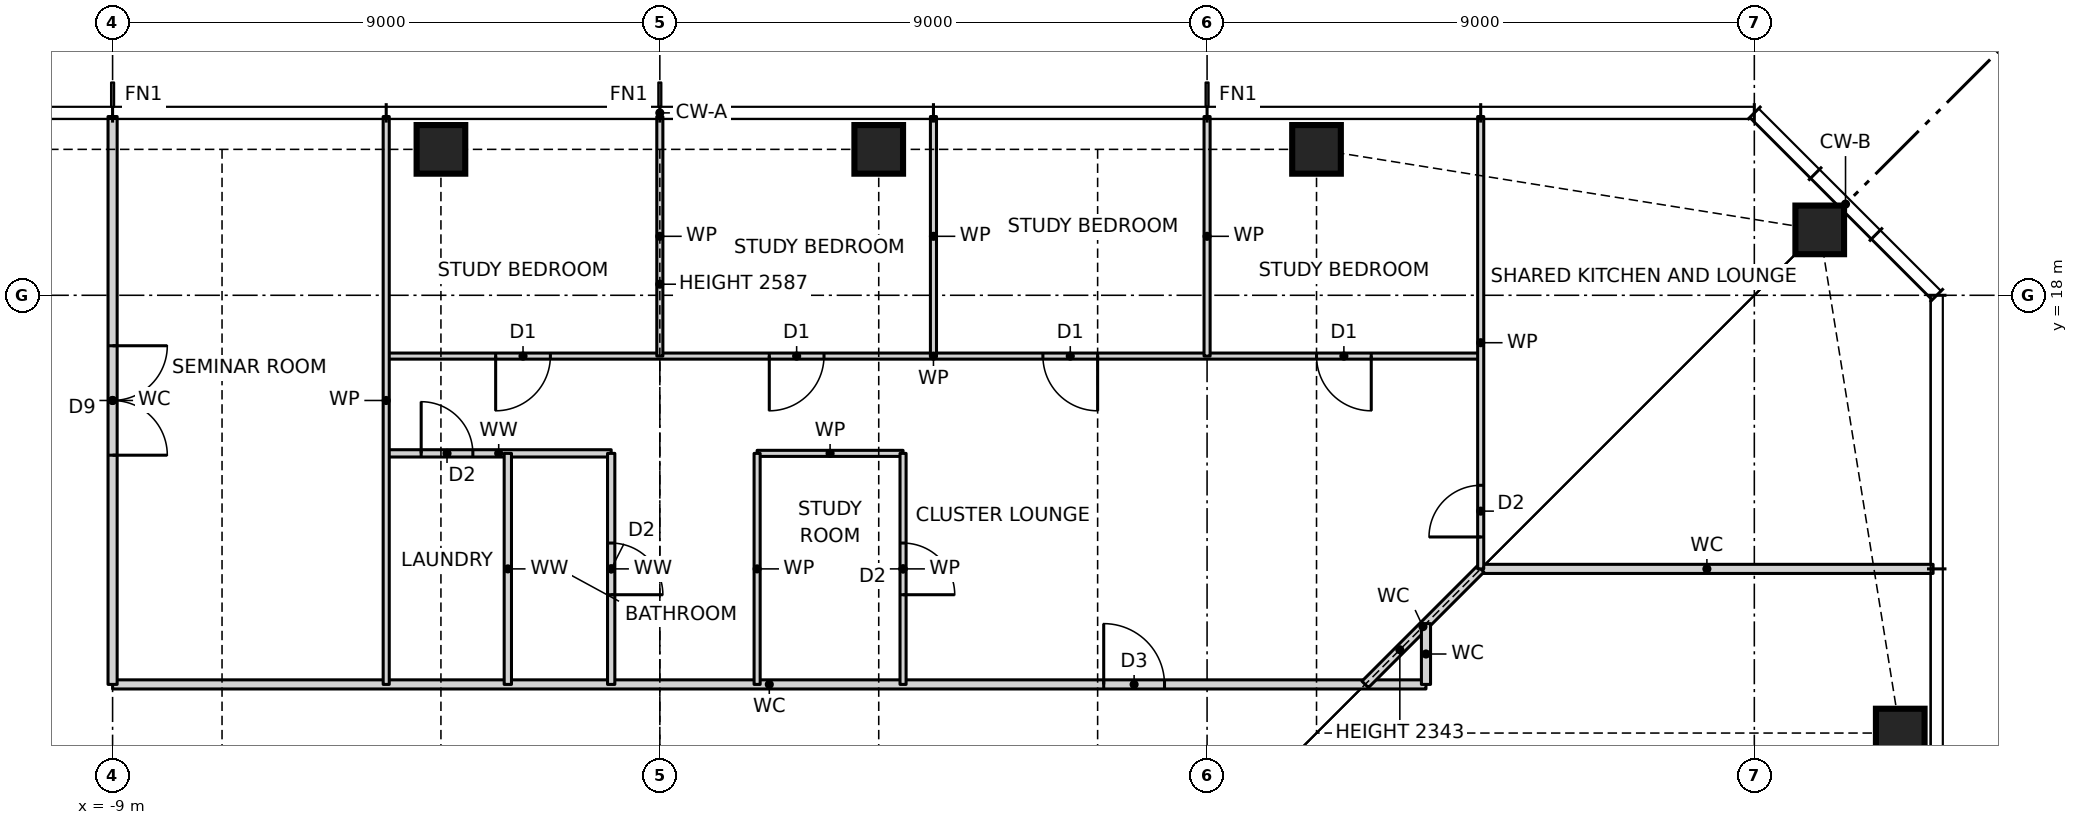
"""IFC4 building model, lengths in metres.
Left out: names, types, materials, properties, quantities, classifications, styles, units other than length and angle.
Written with IfcOpenShell. Run it as: python <this file> out.ifc"""

import sys

from ifc_helpers import new_model, si_unit, direction, frame, frame_2d, origin, origin_2d, place, context, subcontext, project, spatial, rectangle, hollow_rectangle, extrude, element, fill, save


model = new_model("IFC4")
c1 = context("Model", 3, precision=1e-05, world=origin(), true_north=direction((0.0, 1.0)))
c2 = subcontext(c1, "Body", "Model", "MODEL_VIEW")
j1 = project(units=[si_unit("LENGTHUNIT", "METRE"), si_unit("PLANEANGLEUNIT", "RADIAN")], contexts=[c1])
p1 = place(None, origin())
s1 = spatial("IfcSite", under=j1, at=p1, CompositionType="ELEMENT")
p2 = place(p1, origin())
s2 = spatial("IfcBuilding", under=s1, at=p2, CompositionType="ELEMENT")
p3 = place(p2, frame((0.0, 0.0, 94.5)))
s3 = spatial("IfcBuildingStorey", under=s2, at=p3, CompositionType="ELEMENT", Elevation=94.5)
for number, where, z_axis, x_axis in (
    (1, (20.4, 10.8, 0.0), (0.0, 0.0, 1.0), (1.0, 0.0, 0.0)),
    (2, (19.076, 19.076, 0.0), (0.0, 0.0, 1.0), (1.0, 0.0, 0.0)),
    (3, (10.8, 20.4, 0.0), (0.0, 0.0, 1.0), (1.0, 0.0, 0.0)),
    (4, (3.6, 20.4, 0.0), (0.0, 0.0, 1.0), (1.0, 0.0, 0.0)),
    (5, (-3.6, 20.4, 0.0), (0.0, 0.0, 1.0), (1.0, 0.0, 0.0)),
):
    element("IfcColumn", number, at=place(p3, frame(where, z_axis=z_axis, x_axis=x_axis)), inside=s3, PredefinedType="COLUMN", context=c2, shape_type="SweptSolid", body=[
        extrude(hollow_rectangle(XDim=0.8, YDim=0.8, WallThickness=0.07, at=origin_2d()), origin(), (0.0, 0.0, 1.0), 3.5),
    ])
p4 = place(p3, frame((-9.0, 11.6, 0.0), z_axis=(0.0, 0.0, 1.0), x_axis=(1.0, 0.0, 0.0)))
e6 = element("IfcWall", 6, at=p4, inside=s3, PredefinedType="PARTITIONING", context=c2, shape_type="SweptSolid", body=[
    extrude(rectangle(XDim=21.6, YDim=0.15, at=frame_2d((10.8, 0.0))), origin(), (0.0, 0.0, 1.0), 3.27),
])
p5 = place(p4, frame((16.3, 0.0, 0.0)))
e7 = element("IfcOpeningElement", 7, at=p5, cuts=e6, PredefinedType="OPENING", context=c2, shape_type="SweptSolid", body=[
    extrude(rectangle(XDim=1.0, YDim=2.1, at=frame_2d((0.5, 1.05))), frame((0.0, 0.085, 0.0), z_axis=(0.0, -1.0, 0.0), x_axis=(1.0, 0.0, 0.0)), (0.0, 0.0, 1.0), 0.17),
])
p6 = place(p3, frame((13.5, 13.5, 0.0), z_axis=(0.0, 0.0, 1.0), x_axis=(1.0, 0.0, 0.0)))
e8 = element("IfcWall", 8, at=p6, inside=s3, PredefinedType="PARTITIONING", context=c2, shape_type="SweptSolid", body=[
    extrude(rectangle(XDim=7.44, YDim=0.15, at=frame_2d((3.72, 0.0))), origin(), (0.0, 0.0, 1.0), 3.27),
])
p7 = place(p3, frame((-4.5, 15.4, 0.0), z_axis=(0.0, 0.0, 1.0), x_axis=(1.0, 0.0, 0.0)))
e9 = element("IfcWall", 9, at=p7, inside=s3, PredefinedType="PARTITIONING", context=c2, shape_type="SweptSolid", body=[
    extrude(rectangle(XDim=3.7, YDim=0.12, at=frame_2d((1.85, 0.0))), origin(), (0.0, 0.0, 1.0), 3.27),
])
p8 = place(p7, frame((0.575, 0.0, 0.0)))
e10 = element("IfcOpeningElement", 10, at=p8, cuts=e9, PredefinedType="OPENING", context=c2, shape_type="SweptSolid", body=[
    extrude(rectangle(XDim=0.85, YDim=2.1, at=frame_2d((0.425, 1.05))), frame((0.0, 0.07, 0.0), z_axis=(0.0, -1.0, 0.0), x_axis=(1.0, 0.0, 0.0)), (0.0, 0.0, 1.0), 0.14),
])
p9 = place(p3, frame((1.6, 15.4, 0.0), z_axis=(0.0, 0.0, 1.0), x_axis=(1.0, 0.0, 0.0)))
e11 = element("IfcWall", 11, at=p9, inside=s3, PredefinedType="PARTITIONING", context=c2, shape_type="SweptSolid", body=[
    extrude(rectangle(XDim=2.4, YDim=0.1, at=frame_2d((1.2, 0.0))), origin(), (0.0, 0.0, 1.0), 3.27),
])
p10 = place(p3, frame((-4.5, 17.0, 0.0), z_axis=(0.0, 0.0, 1.0), x_axis=(1.0, 0.0, 0.0)))
e12 = element("IfcWall", 12, at=p10, inside=s3, PredefinedType="PARTITIONING", context=c2, shape_type="SweptSolid", body=[
    extrude(rectangle(XDim=18.0, YDim=0.1, at=frame_2d((9.0, 0.0))), origin(), (0.0, 0.0, 1.0), 3.27),
])
p11 = place(p10, frame((15.3, 0.0, 0.0)))
e13 = element("IfcOpeningElement", 13, at=p11, cuts=e12, PredefinedType="OPENING", context=c2, shape_type="SweptSolid", body=[
    extrude(rectangle(XDim=0.9, YDim=2.1, at=frame_2d((0.45, 1.05))), frame((0.0, 0.06, 0.0), z_axis=(0.0, -1.0, 0.0), x_axis=(1.0, 0.0, 0.0)), (0.0, 0.0, 1.0), 0.12),
])
p12 = place(p10, frame((10.8, 0.0, 0.0)))
e14 = element("IfcOpeningElement", 14, at=p12, cuts=e12, PredefinedType="OPENING", context=c2, shape_type="SweptSolid", body=[
    extrude(rectangle(XDim=0.9, YDim=2.1, at=frame_2d((0.45, 1.05))), frame((0.0, 0.06, 0.0), z_axis=(0.0, -1.0, 0.0), x_axis=(1.0, 0.0, 0.0)), (0.0, 0.0, 1.0), 0.12),
])
p13 = place(p10, frame((6.3, 0.0, 0.0)))
e15 = element("IfcOpeningElement", 15, at=p13, cuts=e12, PredefinedType="OPENING", context=c2, shape_type="SweptSolid", body=[
    extrude(rectangle(XDim=0.9, YDim=2.1, at=frame_2d((0.45, 1.05))), frame((0.0, 0.06, 0.0), z_axis=(0.0, -1.0, 0.0), x_axis=(1.0, 0.0, 0.0)), (0.0, 0.0, 1.0), 0.12),
])
p14 = place(p10, frame((1.8, 0.0, 0.0)))
e16 = element("IfcOpeningElement", 16, at=p14, cuts=e12, PredefinedType="OPENING", context=c2, shape_type="SweptSolid", body=[
    extrude(rectangle(XDim=0.9, YDim=2.1, at=frame_2d((0.45, 1.05))), frame((0.0, 0.06, 0.0), z_axis=(0.0, -1.0, 0.0), x_axis=(1.0, 0.0, 0.0)), (0.0, 0.0, 1.0), 0.12),
])
p15 = place(p3, frame((11.6, 11.6, 0.0), z_axis=(0.0, 0.0, 1.0), x_axis=(0.707106781187, 0.707106781187, 0.0)))
e17 = element("IfcWall", 17, at=p15, inside=s3, PredefinedType="PARTITIONING", context=c2, shape_type="SweptSolid", body=[
    extrude(rectangle(XDim=2.687, YDim=0.15, at=frame_2d((1.343, 0.0))), origin(), (0.0, 0.0, 1.0), 2.343),
])
p16 = place(p3, frame((13.5, 13.5, 0.0), z_axis=(0.0, 0.0, 1.0), x_axis=(0.0, 1.0, 0.0)))
e18 = element("IfcWall", 18, at=p16, inside=s3, PredefinedType="PARTITIONING", context=c2, shape_type="SweptSolid", body=[
    extrude(rectangle(XDim=7.44, YDim=0.1, at=frame_2d((3.72, 0.0))), origin(), (0.0, 0.0, 1.0), 3.27),
])
p17 = place(p16, frame((0.525, 0.0, 0.0)))
e19 = element("IfcOpeningElement", 19, at=p17, cuts=e18, PredefinedType="OPENING", context=c2, shape_type="SweptSolid", body=[
    extrude(rectangle(XDim=0.85, YDim=2.1, at=frame_2d((0.425, 1.05))), frame((0.0, 0.06, 0.0), z_axis=(0.0, -1.0, 0.0), x_axis=(1.0, 0.0, 0.0)), (0.0, 0.0, 1.0), 0.12),
])
p18 = place(p3, frame((12.6, 11.6, 0.0), z_axis=(0.0, 0.0, 1.0), x_axis=(0.0, 1.0, 0.0)))
e20 = element("IfcWall", 20, at=p18, inside=s3, PredefinedType="PARTITIONING", context=c2, shape_type="SweptSolid", body=[
    extrude(rectangle(XDim=1.0, YDim=0.15, at=frame_2d((0.5, 0.0))), origin(), (0.0, 0.0, 1.0), 3.27),
])
for number, where, z_axis, x_axis in (
    (21, (9.0, 17.0, 0.0), (0.0, 0.0, 1.0), (0.0, 1.0, 0.0)),
    (22, (4.5, 17.0, 0.0), (0.0, 0.0, 1.0), (0.0, 1.0, 0.0)),
):
    element("IfcWall", number, at=place(p3, frame(where, z_axis=z_axis, x_axis=x_axis)), inside=s3, PredefinedType="PARTITIONING", context=c2, shape_type="SweptSolid", body=[
        extrude(rectangle(XDim=3.94, YDim=0.1, at=frame_2d((1.97, 0.0))), origin(), (0.0, 0.0, 1.0), 3.27),
    ])
p19 = place(p3, frame((4.0, 11.6, 0.0), z_axis=(0.0, 0.0, 1.0), x_axis=(0.0, 1.0, 0.0)))
e23 = element("IfcWall", 23, at=p19, inside=s3, PredefinedType="PARTITIONING", context=c2, shape_type="SweptSolid", body=[
    extrude(rectangle(XDim=3.8, YDim=0.1, at=frame_2d((1.9, 0.0))), origin(), (0.0, 0.0, 1.0), 3.27),
])
p20 = place(p19, frame((1.475, 0.0, 0.0)))
e24 = element("IfcOpeningElement", 24, at=p20, cuts=e23, PredefinedType="OPENING", context=c2, shape_type="SweptSolid", body=[
    extrude(rectangle(XDim=0.85, YDim=2.1, at=frame_2d((0.425, 1.05))), frame((0.0, 0.06, 0.0), z_axis=(0.0, -1.0, 0.0), x_axis=(1.0, 0.0, 0.0)), (0.0, 0.0, 1.0), 0.12),
])
p21 = place(p3, frame((1.6, 11.6, 0.0), z_axis=(0.0, 0.0, 1.0), x_axis=(0.0, 1.0, 0.0)))
e25 = element("IfcWall", 25, at=p21, inside=s3, PredefinedType="PARTITIONING", context=c2, shape_type="SweptSolid", body=[
    extrude(rectangle(XDim=3.8, YDim=0.1, at=frame_2d((1.9, 0.0))), origin(), (0.0, 0.0, 1.0), 3.27),
])
p22 = place(p3, frame((0.0, 17.0, 0.0), z_axis=(0.0, 0.0, 1.0), x_axis=(0.0, 1.0, 0.0)))
e26 = element("IfcWall", 26, at=p22, inside=s3, PredefinedType="PARTITIONING", context=c2, shape_type="SweptSolid", body=[
    extrude(rectangle(XDim=3.94, YDim=0.1, at=frame_2d((1.97, 0.0))), origin(), (0.0, 0.0, 1.0), 2.587),
])
p23 = place(p3, frame((-0.8, 11.6, 0.0), z_axis=(0.0, 0.0, 1.0), x_axis=(0.0, 1.0, 0.0)))
e27 = element("IfcWall", 27, at=p23, inside=s3, PredefinedType="PARTITIONING", context=c2, shape_type="SweptSolid", body=[
    extrude(rectangle(XDim=3.8, YDim=0.12, at=frame_2d((1.9, 0.0))), origin(), (0.0, 0.0, 1.0), 3.27),
])
p24 = place(p23, frame((1.475, 0.0, 0.0)))
e28 = element("IfcOpeningElement", 28, at=p24, cuts=e27, PredefinedType="OPENING", context=c2, shape_type="SweptSolid", body=[
    extrude(rectangle(XDim=0.85, YDim=2.1, at=frame_2d((0.425, 1.05))), frame((0.0, 0.07, 0.0), z_axis=(0.0, -1.0, 0.0), x_axis=(1.0, 0.0, 0.0)), (0.0, 0.0, 1.0), 0.14),
])
p25 = place(p3, frame((-2.5, 11.6, 0.0), z_axis=(0.0, 0.0, 1.0), x_axis=(0.0, 1.0, 0.0)))
e29 = element("IfcWall", 29, at=p25, inside=s3, PredefinedType="PARTITIONING", context=c2, shape_type="SweptSolid", body=[
    extrude(rectangle(XDim=3.8, YDim=0.12, at=frame_2d((1.9, 0.0))), origin(), (0.0, 0.0, 1.0), 3.27),
])
p26 = place(p3, frame((-4.5, 11.6, 0.0), z_axis=(0.0, 0.0, 1.0), x_axis=(0.0, 1.0, 0.0)))
e30 = element("IfcWall", 30, at=p26, inside=s3, PredefinedType="PARTITIONING", context=c2, shape_type="SweptSolid", body=[
    extrude(rectangle(XDim=9.34, YDim=0.1, at=frame_2d((4.67, 0.0))), origin(), (0.0, 0.0, 1.0), 3.27),
])
p27 = place(p3, frame((-9.0, 11.6, 0.0), z_axis=(0.0, 0.0, 1.0), x_axis=(0.0, 1.0, 0.0)))
e31 = element("IfcWall", 31, at=p27, inside=s3, PredefinedType="PARTITIONING", context=c2, shape_type="SweptSolid", body=[
    extrude(rectangle(XDim=9.34, YDim=0.15, at=frame_2d((4.67, 0.0))), origin(), (0.0, 0.0, 1.0), 3.27),
])
p28 = place(p27, frame((3.77, 0.0, 0.0)))
e32 = element("IfcOpeningElement", 32, at=p28, cuts=e31, PredefinedType="OPENING", context=c2, shape_type="SweptSolid", body=[
    extrude(rectangle(XDim=1.8, YDim=2.1, at=frame_2d((0.9, 1.05))), frame((0.0, 0.085, 0.0), z_axis=(0.0, -1.0, 0.0), x_axis=(1.0, 0.0, 0.0)), (0.0, 0.0, 1.0), 0.17),
])
p29 = place(p11, frame((0.9, 0.0, 0.0), z_axis=(0.0, 0.0, 1.0), x_axis=(-1.0, 0.0, 0.0)))
e33 = element("IfcDoor", 33, at=p29, inside=s3, OperationType="SINGLE_SWING_LEFT", PredefinedType="DOOR", context=c2, shape_type="SweptSolid", body=[
    extrude(rectangle(XDim=0.9, YDim=2.1, at=frame_2d((0.45, 1.05))), frame((0.0, 0.025, 0.0), z_axis=(0.0, -1.0, 0.0), x_axis=(1.0, 0.0, 0.0)), (0.0, 0.0, 1.0), 0.05),
])
fill(e13, e33)
p30 = place(p12, frame((0.9, 0.0, 0.0), z_axis=(0.0, 0.0, 1.0), x_axis=(-1.0, 0.0, 0.0)))
e34 = element("IfcDoor", 34, at=p30, inside=s3, OperationType="SINGLE_SWING_LEFT", PredefinedType="DOOR", context=c2, shape_type="SweptSolid", body=[
    extrude(rectangle(XDim=0.9, YDim=2.1, at=frame_2d((0.45, 1.05))), frame((0.0, 0.025, 0.0), z_axis=(0.0, -1.0, 0.0), x_axis=(1.0, 0.0, 0.0)), (0.0, 0.0, 1.0), 0.05),
])
fill(e14, e34)
p31 = place(p13, frame((0.9, 0.0, 0.0), z_axis=(0.0, 0.0, 1.0), x_axis=(-1.0, 0.0, 0.0)))
e35 = element("IfcDoor", 35, at=p31, inside=s3, OperationType="SINGLE_SWING_RIGHT", PredefinedType="DOOR", context=c2, shape_type="SweptSolid", body=[
    extrude(rectangle(XDim=0.9, YDim=2.1, at=frame_2d((0.45, 1.05))), frame((0.0, 0.025, 0.0), z_axis=(0.0, -1.0, 0.0), x_axis=(1.0, 0.0, 0.0)), (0.0, 0.0, 1.0), 0.05),
])
fill(e15, e35)
p32 = place(p14, frame((0.9, 0.0, 0.0), z_axis=(0.0, 0.0, 1.0), x_axis=(-1.0, 0.0, 0.0)))
e36 = element("IfcDoor", 36, at=p32, inside=s3, OperationType="SINGLE_SWING_RIGHT", PredefinedType="DOOR", context=c2, shape_type="SweptSolid", body=[
    extrude(rectangle(XDim=0.9, YDim=2.1, at=frame_2d((0.45, 1.05))), frame((0.0, 0.025, 0.0), z_axis=(0.0, -1.0, 0.0), x_axis=(1.0, 0.0, 0.0)), (0.0, 0.0, 1.0), 0.05),
])
fill(e16, e36)
p33 = place(p5, origin())
e37 = element("IfcDoor", 37, at=p33, inside=s3, OperationType="SINGLE_SWING_LEFT", PredefinedType="DOOR", context=c2, shape_type="SweptSolid", body=[
    extrude(rectangle(XDim=1.0, YDim=2.1, at=frame_2d((0.5, 1.05))), frame((0.0, 0.025, 0.0), z_axis=(0.0, -1.0, 0.0), x_axis=(1.0, 0.0, 0.0)), (0.0, 0.0, 1.0), 0.05),
])
fill(e7, e37)
p34 = place(p20, frame((0.85, 0.0, 0.0), z_axis=(0.0, 0.0, 1.0), x_axis=(-1.0, 0.0, 0.0)))
e38 = element("IfcDoor", 38, at=p34, inside=s3, OperationType="SINGLE_SWING_RIGHT", PredefinedType="DOOR", context=c2, shape_type="SweptSolid", body=[
    extrude(rectangle(XDim=0.85, YDim=2.1, at=frame_2d((0.425, 1.05))), frame((0.0, 0.025, 0.0), z_axis=(0.0, -1.0, 0.0), x_axis=(1.0, 0.0, 0.0)), (0.0, 0.0, 1.0), 0.05),
])
fill(e24, e38)
p35 = place(p24, frame((0.85, 0.0, 0.0), z_axis=(0.0, 0.0, 1.0), x_axis=(-1.0, 0.0, 0.0)))
e39 = element("IfcDoor", 39, at=p35, inside=s3, OperationType="SINGLE_SWING_RIGHT", PredefinedType="DOOR", context=c2, shape_type="SweptSolid", body=[
    extrude(rectangle(XDim=0.85, YDim=2.1, at=frame_2d((0.425, 1.05))), frame((0.0, 0.025, 0.0), z_axis=(0.0, -1.0, 0.0), x_axis=(1.0, 0.0, 0.0)), (0.0, 0.0, 1.0), 0.05),
])
fill(e28, e39)
p36 = place(p8, origin())
e40 = element("IfcDoor", 40, at=p36, inside=s3, OperationType="SINGLE_SWING_LEFT", PredefinedType="DOOR", context=c2, shape_type="SweptSolid", body=[
    extrude(rectangle(XDim=0.85, YDim=2.1, at=frame_2d((0.425, 1.05))), frame((0.0, 0.025, 0.0), z_axis=(0.0, -1.0, 0.0), x_axis=(1.0, 0.0, 0.0)), (0.0, 0.0, 1.0), 0.05),
])
fill(e10, e40)
p37 = place(p28, frame((1.8, 0.0, 0.0), z_axis=(0.0, 0.0, 1.0), x_axis=(-1.0, 0.0, 0.0)))
e41 = element("IfcDoor", 41, at=p37, inside=s3, OperationType="DOUBLE_DOOR_SINGLE_SWING", PredefinedType="DOOR", context=c2, shape_type="SweptSolid", body=[
    extrude(rectangle(XDim=1.8, YDim=2.1, at=frame_2d((0.9, 1.05))), frame((0.0, 0.025, 0.0), z_axis=(0.0, -1.0, 0.0), x_axis=(1.0, 0.0, 0.0)), (0.0, 0.0, 1.0), 0.05),
])
fill(e32, e41)
p38 = place(p17, origin())
e42 = element("IfcDoor", 42, at=p38, inside=s3, OperationType="SINGLE_SWING_LEFT", PredefinedType="DOOR", context=c2, shape_type="SweptSolid", body=[
    extrude(rectangle(XDim=0.85, YDim=2.1, at=frame_2d((0.425, 1.05))), frame((0.0, 0.025, 0.0), z_axis=(0.0, -1.0, 0.0), x_axis=(1.0, 0.0, 0.0)), (0.0, 0.0, 1.0), 0.05),
])
fill(e19, e42)
save(model, sys.argv[1])
